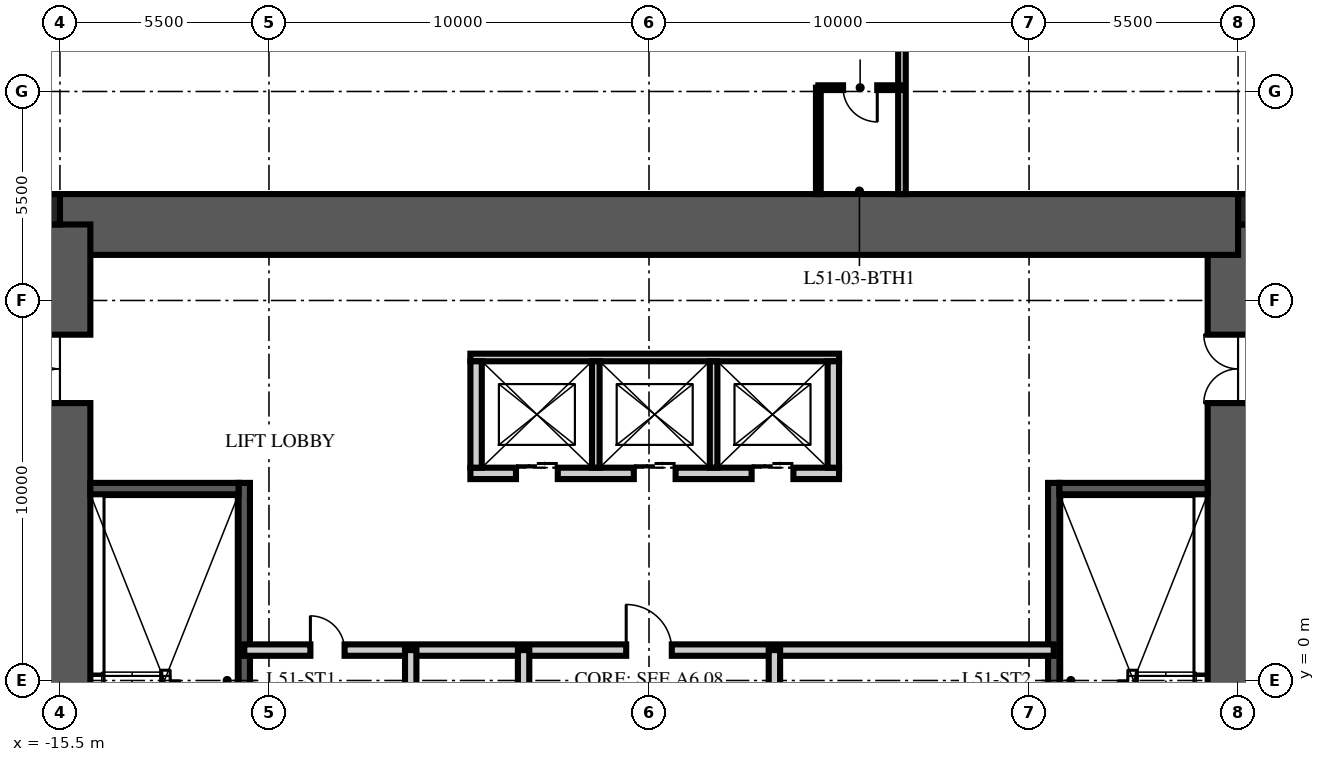
"""IFC4 building model, lengths in metres.
Left out: names, types, materials, properties, quantities, classifications, styles, units other than length and angle.
Written with IfcOpenShell. Run it as: python <this file> out.ifc"""

import sys

from ifc_helpers import new_model, si_unit, direction, frame, frame_2d, origin, origin_2d, place, context, subcontext, project, spatial, rectangle, extrude, element, fill, save


model = new_model("IFC4")
c1 = context("Model", 3, precision=1e-05, world=origin(), true_north=direction((0.0, 1.0)))
c2 = subcontext(c1, "Body", "Model", "MODEL_VIEW")
j1 = project(units=[si_unit("LENGTHUNIT", "METRE"), si_unit("PLANEANGLEUNIT", "RADIAN")], contexts=[c1])
p1 = place(None, origin())
s1 = spatial("IfcSite", under=j1, at=p1, CompositionType="ELEMENT")
p2 = place(p1, origin())
s2 = spatial("IfcBuilding", under=s1, at=p2, CompositionType="ELEMENT")
p3 = place(p2, frame((0.0, 0.0, 207.0)))
s3 = spatial("IfcBuildingStorey", under=s2, at=p3, CompositionType="ELEMENT", Elevation=207.0)
p4 = place(p3, frame((15.5, -12.0, -0.25), z_axis=(0.0, 0.0, 1.0), x_axis=(0.0, 1.0, 0.0)))
e1 = element("IfcWall", 1, at=p4, inside=s3, PredefinedType="SHEAR", context=c2, shape_type="SweptSolid", body=[
    extrude(rectangle(XDim=24.0, YDim=1.6, at=frame_2d((12.0, 0.0))), origin(), (0.0, 0.0, 1.0), 3.75),
])
p5 = place(p4, frame((3.2, 0.0, 0.25)))
e2 = element("IfcOpeningElement", 2, at=p5, cuts=e1, PredefinedType="OPENING", context=c2, shape_type="SweptSolid", body=[
    extrude(rectangle(XDim=1.2, YDim=2.1, at=frame_2d((0.6, 1.05))), frame((0.0, 0.81, 0.0), z_axis=(0.0, -1.0, 0.0), x_axis=(1.0, 0.0, 0.0)), (0.0, 0.0, 1.0), 1.62),
])
p6 = place(p4, frame((19.3, 0.0, 0.25)))
e3 = element("IfcOpeningElement", 3, at=p6, cuts=e1, PredefinedType="OPENING", context=c2, shape_type="SweptSolid", body=[
    extrude(rectangle(XDim=1.8, YDim=2.1, at=frame_2d((0.9, 1.05))), frame((0.0, 0.81, 0.0), z_axis=(0.0, -1.0, 0.0), x_axis=(1.0, 0.0, 0.0)), (0.0, 0.0, 1.0), 1.62),
])
p7 = place(p3, frame((-15.5, 12.0, -0.25), z_axis=(0.0, 0.0, 1.0), x_axis=(1.0, 0.0, 0.0)))
e4 = element("IfcWall", 4, at=p7, inside=s3, PredefinedType="SHEAR", context=c2, shape_type="SweptSolid", body=[
    extrude(rectangle(XDim=31.0, YDim=1.6, at=frame_2d((15.5, 0.0))), origin(), (0.0, 0.0, 1.0), 3.75),
])
p8 = place(p3, frame((-15.5, -12.0, -0.25), z_axis=(0.0, 0.0, 1.0), x_axis=(0.0, 1.0, 0.0)))
e5 = element("IfcWall", 5, at=p8, inside=s3, PredefinedType="SHEAR", context=c2, shape_type="SweptSolid", body=[
    extrude(rectangle(XDim=24.0, YDim=1.6, at=frame_2d((12.0, 0.0))), origin(), (0.0, 0.0, 1.0), 3.75),
])
p9 = place(p8, frame((3.2, 0.0, 0.25)))
e6 = element("IfcOpeningElement", 6, at=p9, cuts=e5, PredefinedType="OPENING", context=c2, shape_type="SweptSolid", body=[
    extrude(rectangle(XDim=1.2, YDim=2.1, at=frame_2d((0.6, 1.05))), frame((0.0, 0.81, 0.0), z_axis=(0.0, -1.0, 0.0), x_axis=(1.0, 0.0, 0.0)), (0.0, 0.0, 1.0), 1.62),
])
p10 = place(p8, frame((19.3, 0.0, 0.25)))
e7 = element("IfcOpeningElement", 7, at=p10, cuts=e5, PredefinedType="OPENING", context=c2, shape_type="SweptSolid", body=[
    extrude(rectangle(XDim=1.8, YDim=2.1, at=frame_2d((0.9, 1.05))), frame((0.0, 0.81, 0.0), z_axis=(0.0, -1.0, 0.0), x_axis=(1.0, 0.0, 0.0)), (0.0, 0.0, 1.0), 1.62),
])
for number, where, z_axis, x_axis in (
    (8, (15.9, 12.4, -0.25), (0.0, 0.0, 1.0), (1.0, 0.0, 0.0)),
    (9, (-15.9, 12.4, -0.25), (0.0, 0.0, 1.0), (1.0, 0.0, 0.0)),
):
    element("IfcColumn", number, at=place(p3, frame(where, z_axis=z_axis, x_axis=x_axis)), inside=s3, PredefinedType="COLUMN", context=c2, shape_type="SweptSolid", body=[
        extrude(rectangle(XDim=0.8, YDim=0.8, at=origin_2d()), origin(), (0.0, 0.0, 1.0), 3.75),
    ])
p11 = place(p3, frame((-10.65, -4.9, 0.0), z_axis=(0.0, 0.0, 1.0), x_axis=(0.0, 1.0, 0.0)))
e10 = element("IfcWall", 10, at=p11, inside=s3, PredefinedType="SOLIDWALL", context=c2, shape_type="SweptSolid", body=[
    extrude(rectangle(XDim=10.1, YDim=0.3, at=frame_2d((5.05, 0.0))), origin(), (0.0, 0.0, 1.0), 3.5),
])
p12 = place(p3, frame((-14.7, 5.05, 0.0), z_axis=(0.0, 0.0, 1.0), x_axis=(1.0, 0.0, 0.0)))
e11 = element("IfcWall", 11, at=p12, inside=s3, PredefinedType="SOLIDWALL", context=c2, shape_type="SweptSolid", body=[
    extrude(rectangle(XDim=3.9, YDim=0.3, at=frame_2d((1.95, 0.0))), origin(), (0.0, 0.0, 1.0), 3.5),
])
p13 = place(p3, frame((10.65, -4.9, 0.0), z_axis=(0.0, 0.0, 1.0), x_axis=(0.0, 1.0, 0.0)))
e12 = element("IfcWall", 12, at=p13, inside=s3, PredefinedType="SOLIDWALL", context=c2, shape_type="SweptSolid", body=[
    extrude(rectangle(XDim=10.1, YDim=0.3, at=frame_2d((5.05, 0.0))), origin(), (0.0, 0.0, 1.0), 3.5),
])
p14 = place(p3, frame((14.7, 5.05, 0.0), z_axis=(0.0, 0.0, 1.0), x_axis=(-1.0, 0.0, 0.0)))
e13 = element("IfcWall", 13, at=p14, inside=s3, PredefinedType="SOLIDWALL", context=c2, shape_type="SweptSolid", body=[
    extrude(rectangle(XDim=3.9, YDim=0.3, at=frame_2d((1.95, 0.0))), origin(), (0.0, 0.0, 1.0), 3.5),
])
p15 = place(p3, frame((-4.7, 5.45, 0.0), z_axis=(0.0, 0.0, 1.0), x_axis=(1.0, 0.0, 0.0)))
e14 = element("IfcWall", 14, at=p15, inside=s3, PredefinedType="PARTITIONING", context=c2, shape_type="SweptSolid", body=[
    extrude(rectangle(XDim=9.7, YDim=0.3, at=frame_2d((4.85, 0.0))), origin(), (0.0, 0.0, 1.0), 3.5),
])
p16 = place(p15, frame((1.2, 0.0, 0.0)))
e15 = element("IfcOpeningElement", 15, at=p16, cuts=e14, PredefinedType="OPENING", context=c2, shape_type="SweptSolid", body=[
    extrude(rectangle(XDim=1.1, YDim=2.1, at=frame_2d((0.55, 1.05))), frame((0.0, 0.16, 0.0), z_axis=(0.0, -1.0, 0.0), x_axis=(1.0, 0.0, 0.0)), (0.0, 0.0, 1.0), 0.32),
])
p17 = place(p15, frame((4.3, 0.0, 0.0)))
e16 = element("IfcOpeningElement", 16, at=p17, cuts=e14, PredefinedType="OPENING", context=c2, shape_type="SweptSolid", body=[
    extrude(rectangle(XDim=1.1, YDim=2.1, at=frame_2d((0.55, 1.05))), frame((0.0, 0.16, 0.0), z_axis=(0.0, -1.0, 0.0), x_axis=(1.0, 0.0, 0.0)), (0.0, 0.0, 1.0), 0.32),
])
p18 = place(p15, frame((7.4, 0.0, 0.0)))
e17 = element("IfcOpeningElement", 17, at=p18, cuts=e14, PredefinedType="OPENING", context=c2, shape_type="SweptSolid", body=[
    extrude(rectangle(XDim=1.1, YDim=2.1, at=frame_2d((0.55, 1.05))), frame((0.0, 0.16, 0.0), z_axis=(0.0, -1.0, 0.0), x_axis=(1.0, 0.0, 0.0)), (0.0, 0.0, 1.0), 0.32),
])
p19 = place(p3, frame((-4.7, 8.5, 0.0), z_axis=(0.0, 0.0, 1.0), x_axis=(1.0, 0.0, 0.0)))
e18 = element("IfcWall", 18, at=p19, inside=s3, PredefinedType="PARTITIONING", context=c2, shape_type="SweptSolid", body=[
    extrude(rectangle(XDim=9.7, YDim=0.2, at=frame_2d((4.85, 0.0))), origin(), (0.0, 0.0, 1.0), 3.5),
])
for number, where, z_axis, x_axis in (
    (19, (-4.55, 5.6, 0.0), (0.0, 0.0, 1.0), (0.0, 1.0, 0.0)),
    (20, (4.85, 5.6, 0.0), (0.0, 0.0, 1.0), (0.0, 1.0, 0.0)),
):
    element("IfcWall", number, at=place(p3, frame(where, z_axis=z_axis, x_axis=x_axis)), inside=s3, PredefinedType="PARTITIONING", context=c2, shape_type="SweptSolid", body=[
        extrude(rectangle(XDim=2.8, YDim=0.3, at=frame_2d((1.4, 0.0))), origin(), (0.0, 0.0, 1.0), 3.5),
    ])
for number, where, z_axis, x_axis in (
    (21, (-1.4, 5.6, 0.0), (0.0, 0.0, 1.0), (0.0, 1.0, 0.0)),
    (22, (1.7, 5.6, 0.0), (0.0, 0.0, 1.0), (0.0, 1.0, 0.0)),
):
    element("IfcWall", number, at=place(p3, frame(where, z_axis=z_axis, x_axis=x_axis)), inside=s3, PredefinedType="PARTITIONING", context=c2, shape_type="SweptSolid", body=[
        extrude(rectangle(XDim=2.8, YDim=0.2, at=frame_2d((1.4, 0.0))), origin(), (0.0, 0.0, 1.0), 3.5),
    ])
p20 = place(p3, frame((-10.65, 0.8, 0.0), z_axis=(0.0, 0.0, 1.0), x_axis=(1.0, 0.0, 0.0)))
e23 = element("IfcWall", 23, at=p20, inside=s3, PredefinedType="PARTITIONING", context=c2, shape_type="SweptSolid", body=[
    extrude(rectangle(XDim=21.3, YDim=0.3, at=frame_2d((10.65, 0.0))), origin(), (0.0, 0.0, 1.0), 3.5),
])
p21 = place(p20, frame((10.05, 0.0, 0.0)))
e24 = element("IfcOpeningElement", 24, at=p21, cuts=e23, PredefinedType="OPENING", context=c2, shape_type="SweptSolid", body=[
    extrude(rectangle(XDim=1.2, YDim=2.1, at=frame_2d((0.6, 1.05))), frame((0.0, 0.16, 0.0), z_axis=(0.0, -1.0, 0.0), x_axis=(1.0, 0.0, 0.0)), (0.0, 0.0, 1.0), 0.32),
])
p22 = place(p20, frame((1.74, 0.0, 0.0)))
e25 = element("IfcOpeningElement", 25, at=p22, cuts=e23, PredefinedType="OPENING", context=c2, shape_type="SweptSolid", body=[
    extrude(rectangle(XDim=0.9, YDim=2.1, at=frame_2d((0.45, 1.05))), frame((0.0, 0.16, 0.0), z_axis=(0.0, -1.0, 0.0), x_axis=(1.0, 0.0, 0.0)), (0.0, 0.0, 1.0), 0.32),
])
p23 = place(p3, frame((-3.3, -6.65, 0.0), z_axis=(0.0, 0.0, 1.0), x_axis=(0.0, 1.0, 0.0)))
e26 = element("IfcWall", 26, at=p23, inside=s3, PredefinedType="PARTITIONING", context=c2, shape_type="SweptSolid", body=[
    extrude(rectangle(XDim=7.45, YDim=0.3, at=frame_2d((3.725, 0.0))), origin(), (0.0, 0.0, 1.0), 3.5),
])
p24 = place(p23, frame((3.275, 0.0, 0.0)))
e27 = element("IfcOpeningElement", 27, at=p24, cuts=e26, PredefinedType="OPENING", context=c2, shape_type="SweptSolid", body=[
    extrude(rectangle(XDim=0.9, YDim=2.1, at=frame_2d((0.45, 1.05))), frame((0.0, 0.16, 0.0), z_axis=(0.0, -1.0, 0.0), x_axis=(1.0, 0.0, 0.0)), (0.0, 0.0, 1.0), 0.32),
])
p25 = place(p3, frame((3.3, -6.65, 0.0), z_axis=(0.0, 0.0, 1.0), x_axis=(0.0, 1.0, 0.0)))
e28 = element("IfcWall", 28, at=p25, inside=s3, PredefinedType="PARTITIONING", context=c2, shape_type="SweptSolid", body=[
    extrude(rectangle(XDim=7.45, YDim=0.3, at=frame_2d((3.725, 0.0))), origin(), (0.0, 0.0, 1.0), 3.5),
])
p26 = place(p25, frame((1.231, 0.0, 0.0)))
e29 = element("IfcOpeningElement", 29, at=p26, cuts=e28, PredefinedType="OPENING", context=c2, shape_type="SweptSolid", body=[
    extrude(rectangle(XDim=0.9, YDim=2.1, at=frame_2d((0.45, 1.05))), frame((0.0, 0.16, 0.0), z_axis=(0.0, -1.0, 0.0), x_axis=(1.0, 0.0, 0.0)), (0.0, 0.0, 1.0), 0.32),
])
p27 = place(p25, frame((4.956, 0.0, 0.0)))
e30 = element("IfcOpeningElement", 30, at=p27, cuts=e28, PredefinedType="OPENING", context=c2, shape_type="SweptSolid", body=[
    extrude(rectangle(XDim=0.9, YDim=2.1, at=frame_2d((0.45, 1.05))), frame((0.0, 0.16, 0.0), z_axis=(0.0, -1.0, 0.0), x_axis=(1.0, 0.0, 0.0)), (0.0, 0.0, 1.0), 0.32),
])
p28 = place(p3, frame((-6.27, -6.65, 0.0), z_axis=(0.0, 0.0, 1.0), x_axis=(0.0, 1.0, 0.0)))
e31 = element("IfcWall", 31, at=p28, inside=s3, PredefinedType="PARTITIONING", context=c2, shape_type="SweptSolid", body=[
    extrude(rectangle(XDim=7.45, YDim=0.3, at=frame_2d((3.725, 0.0))), origin(), (0.0, 0.0, 1.0), 3.5),
])
p29 = place(p3, frame((6.656, 12.8, 0.0), z_axis=(0.0, 0.0, 1.0), x_axis=(0.0, 1.0, 0.0)))
e32 = element("IfcWall", 32, at=p29, inside=s3, PredefinedType="PARTITIONING", context=c2, shape_type="SweptSolid", body=[
    extrude(rectangle(XDim=13.65, YDim=0.2, at=frame_2d((6.825, 0.0))), origin(), (0.0, 0.0, 1.0), 2.91),
])
p30 = place(p3, frame((6.656, 15.6, 0.0), z_axis=(0.0, 0.0, 1.0), x_axis=(-1.0, 0.0, 0.0)))
e33 = element("IfcWall", 33, at=p30, inside=s3, PredefinedType="PARTITIONING", context=c2, shape_type="SweptSolid", body=[
    extrude(rectangle(XDim=2.2, YDim=0.125, at=frame_2d((1.1, 0.0))), origin(), (0.0, 0.0, 1.0), 3.5),
])
p31 = place(p30, frame((0.65, 0.0, 0.0)))
e34 = element("IfcOpeningElement", 34, at=p31, cuts=e33, PredefinedType="OPENING", context=c2, shape_type="SweptSolid", body=[
    extrude(rectangle(XDim=0.9, YDim=2.1, at=frame_2d((0.45, 1.05))), frame((0.0, 0.073, 0.0), z_axis=(0.0, -1.0, 0.0), x_axis=(1.0, 0.0, 0.0)), (0.0, 0.0, 1.0), 0.145),
])
p32 = place(p3, frame((4.456, 12.8, 0.0), z_axis=(0.0, 0.0, 1.0), x_axis=(0.0, 1.0, 0.0)))
e35 = element("IfcWall", 35, at=p32, inside=s3, PredefinedType="PARTITIONING", context=c2, shape_type="SweptSolid", body=[
    extrude(rectangle(XDim=2.8, YDim=0.125, at=frame_2d((1.4, 0.0))), origin(), (0.0, 0.0, 1.0), 3.5),
])
p33 = place(p10, origin())
e36 = element("IfcDoor", 36, at=p33, inside=s3, OperationType="DOUBLE_DOOR_SINGLE_SWING", PredefinedType="DOOR", context=c2, shape_type="SweptSolid", body=[
    extrude(rectangle(XDim=1.8, YDim=2.1, at=frame_2d((0.9, 1.05))), frame((0.0, 0.025, 0.0), z_axis=(0.0, -1.0, 0.0), x_axis=(1.0, 0.0, 0.0)), (0.0, 0.0, 1.0), 0.05),
])
fill(e7, e36)
p34 = place(p6, origin())
e37 = element("IfcDoor", 37, at=p34, inside=s3, OperationType="DOUBLE_DOOR_SINGLE_SWING", PredefinedType="DOOR", context=c2, shape_type="SweptSolid", body=[
    extrude(rectangle(XDim=1.8, YDim=2.1, at=frame_2d((0.9, 1.05))), frame((0.0, 0.025, 0.0), z_axis=(0.0, -1.0, 0.0), x_axis=(1.0, 0.0, 0.0)), (0.0, 0.0, 1.0), 0.05),
])
fill(e3, e37)
p35 = place(p16, origin())
e38 = element("IfcDoor", 38, at=p35, inside=s3, OperationType="DOUBLE_DOOR_SLIDING", PredefinedType="DOOR", context=c2, shape_type="SweptSolid", body=[
    extrude(rectangle(XDim=1.1, YDim=2.1, at=frame_2d((0.55, 1.05))), frame((0.0, 0.025, 0.0), z_axis=(0.0, -1.0, 0.0), x_axis=(1.0, 0.0, 0.0)), (0.0, 0.0, 1.0), 0.05),
])
fill(e15, e38)
p36 = place(p17, origin())
e39 = element("IfcDoor", 39, at=p36, inside=s3, OperationType="DOUBLE_DOOR_SLIDING", PredefinedType="DOOR", context=c2, shape_type="SweptSolid", body=[
    extrude(rectangle(XDim=1.1, YDim=2.1, at=frame_2d((0.55, 1.05))), frame((0.0, 0.025, 0.0), z_axis=(0.0, -1.0, 0.0), x_axis=(1.0, 0.0, 0.0)), (0.0, 0.0, 1.0), 0.05),
])
fill(e16, e39)
p37 = place(p18, origin())
e40 = element("IfcDoor", 40, at=p37, inside=s3, OperationType="DOUBLE_DOOR_SLIDING", PredefinedType="DOOR", context=c2, shape_type="SweptSolid", body=[
    extrude(rectangle(XDim=1.1, YDim=2.1, at=frame_2d((0.55, 1.05))), frame((0.0, 0.025, 0.0), z_axis=(0.0, -1.0, 0.0), x_axis=(1.0, 0.0, 0.0)), (0.0, 0.0, 1.0), 0.05),
])
fill(e17, e40)
p38 = place(p21, origin())
e41 = element("IfcDoor", 41, at=p38, inside=s3, OperationType="SINGLE_SWING_LEFT", PredefinedType="DOOR", context=c2, shape_type="SweptSolid", body=[
    extrude(rectangle(XDim=1.2, YDim=2.1, at=frame_2d((0.6, 1.05))), frame((0.0, 0.025, 0.0), z_axis=(0.0, -1.0, 0.0), x_axis=(1.0, 0.0, 0.0)), (0.0, 0.0, 1.0), 0.05),
])
fill(e24, e41)
p39 = place(p22, origin())
e42 = element("IfcDoor", 42, at=p39, inside=s3, OperationType="SINGLE_SWING_LEFT", PredefinedType="DOOR", context=c2, shape_type="SweptSolid", body=[
    extrude(rectangle(XDim=0.9, YDim=2.1, at=frame_2d((0.45, 1.05))), frame((0.0, 0.025, 0.0), z_axis=(0.0, -1.0, 0.0), x_axis=(1.0, 0.0, 0.0)), (0.0, 0.0, 1.0), 0.05),
])
fill(e25, e42)
p40 = place(p31, origin())
e43 = element("IfcDoor", 43, at=p40, inside=s3, OperationType="SINGLE_SWING_LEFT", PredefinedType="DOOR", context=c2, shape_type="SweptSolid", body=[
    extrude(rectangle(XDim=0.9, YDim=2.1, at=frame_2d((0.45, 1.05))), frame((0.0, 0.025, 0.0), z_axis=(0.0, -1.0, 0.0), x_axis=(1.0, 0.0, 0.0)), (0.0, 0.0, 1.0), 0.05),
])
fill(e34, e43)
save(model, sys.argv[1])
